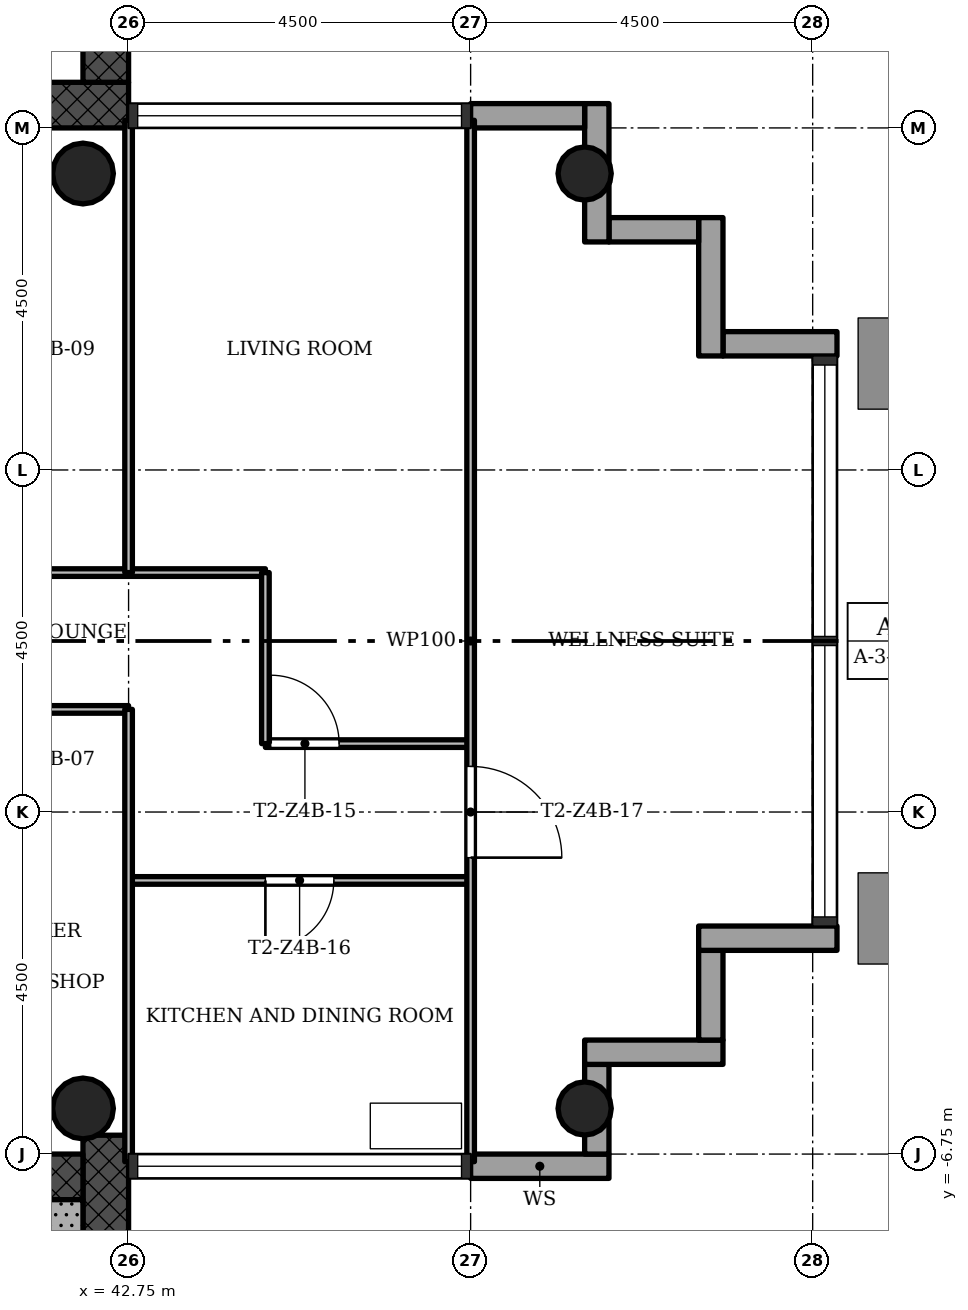
"""IFC4 building model, lengths in metres.
Left out: names, types, materials, properties, quantities, classifications, styles, units other than length and angle.
Written with IfcOpenShell. Run it as: python <this file> out.ifc"""

import sys

from ifc_helpers import new_model, si_unit, direction, frame, frame_2d, origin, origin_2d, place, context, subcontext, project, spatial, rectangle, hollow_circle, extrude, element, fill, save


model = new_model("IFC4")
c1 = context("Model", 3, precision=1e-05, world=origin(), true_north=direction((0.0, 1.0)))
c2 = subcontext(c1, "Body", "Model", "MODEL_VIEW")
j1 = project(units=[si_unit("LENGTHUNIT", "METRE"), si_unit("PLANEANGLEUNIT", "RADIAN")], contexts=[c1])
p1 = place(None, origin())
s1 = spatial("IfcSite", under=j1, at=p1, CompositionType="ELEMENT")
p2 = place(p1, origin())
s2 = spatial("IfcBuilding", under=s1, at=p2, CompositionType="ELEMENT")
p3 = place(p2, frame((0.0, 0.0, 230.0)))
s3 = spatial("IfcBuildingStorey", under=s2, at=p3, CompositionType="ELEMENT", Elevation=230.0)
p4 = place(p3, frame((29.85, 7.05, 0.0), z_axis=(0.0, 0.0, 1.0), x_axis=(1.0, 0.0, 0.0)))
e1 = element("IfcWall", 1, at=p4, inside=s3, PredefinedType="SHEAR", context=c2, shape_type="SweptSolid", body=[
    extrude(rectangle(XDim=12.9, YDim=0.6, at=frame_2d((6.45, 0.0))), origin(), (0.0, 0.0, 1.0), 3.4),
])
p5 = place(p4, frame((5.25, 0.0, 0.0)))
e2 = element("IfcOpeningElement", 2, at=p5, cuts=e1, PredefinedType="OPENING", context=c2, shape_type="SweptSolid", body=[
    extrude(rectangle(XDim=1.8, YDim=2.1, at=frame_2d((0.9, 1.05))), frame((0.0, 0.31, 0.0), z_axis=(0.0, -1.0, 0.0), x_axis=(1.0, 0.0, 0.0)), (0.0, 0.0, 1.0), 0.62),
])
p6 = place(p3, frame((42.45, 7.35, 0.0), z_axis=(0.0, 0.0, 1.0), x_axis=(0.0, 1.0, 0.0)))
e3 = element("IfcWall", 3, at=p6, inside=s3, PredefinedType="SHEAR", context=c2, shape_type="SweptSolid", body=[
    extrude(rectangle(XDim=8.4, YDim=0.6, at=frame_2d((4.2, 0.0))), origin(), (0.0, 0.0, 1.0), 3.4),
])
p7 = place(p3, frame((42.45, -15.15, 0.0), z_axis=(0.0, 0.0, 1.0), x_axis=(0.0, 1.0, 0.0)))
e4 = element("IfcWall", 4, at=p7, inside=s3, PredefinedType="SHEAR", context=c2, shape_type="SweptSolid", body=[
    extrude(rectangle(XDim=8.648, YDim=0.6, at=frame_2d((4.324, 0.0))), origin(), (0.0, 0.0, 1.0), 3.4),
])
p8 = place(p3, frame((42.15, -7.05, 0.0), z_axis=(0.0, 0.0, 1.0), x_axis=(-1.0, 0.0, 0.0)))
e5 = element("IfcWall", 5, at=p8, inside=s3, PredefinedType="SHEAR", context=c2, shape_type="SweptSolid", body=[
    extrude(rectangle(XDim=12.9, YDim=0.6, at=frame_2d((6.45, 0.0))), origin(), (0.0, 0.0, 1.0), 3.4),
])
p9 = place(p8, frame((5.25, 0.0, 0.0)))
e6 = element("IfcOpeningElement", 6, at=p9, cuts=e5, PredefinedType="OPENING", context=c2, shape_type="SweptSolid", body=[
    extrude(rectangle(XDim=1.8, YDim=2.1, at=frame_2d((0.9, 1.05))), frame((0.0, 0.31, 0.0), z_axis=(0.0, -1.0, 0.0), x_axis=(1.0, 0.0, 0.0)), (0.0, 0.0, 1.0), 0.62),
])
for number, where, z_axis, x_axis in (
    (7, (48.75, -6.15, 0.0), (0.0, 0.0, 1.0), (1.0, 0.0, 0.0)),
    (8, (48.75, 6.15, 0.0), (0.0, 0.0, 1.0), (1.0, 0.0, 0.0)),
):
    element("IfcColumn", number, at=place(p3, frame(where, z_axis=z_axis, x_axis=x_axis)), inside=s3, PredefinedType="COLUMN", context=c2, shape_type="SweptSolid", body=[
        extrude(hollow_circle(Radius=0.35, WallThickness=0.025, at=origin_2d()), origin(), (0.0, 0.0, 1.0), 3.4),
    ])
for number, where, z_axis, x_axis in (
    (9, (42.15, -6.15, 0.0), (0.0, 0.0, 1.0), (1.0, 0.0, 0.0)),
    (10, (42.15, 6.15, 0.0), (0.0, 0.0, 1.0), (1.0, 0.0, 0.0)),
):
    element("IfcColumn", number, at=place(p3, frame(where, z_axis=z_axis, x_axis=x_axis)), inside=s3, PredefinedType="COLUMN", context=c2, shape_type="SweptSolid", body=[
        extrude(hollow_circle(Radius=0.4, WallThickness=0.028, at=origin_2d()), origin(), (0.0, 0.0, 1.0), 3.4),
    ])
p10 = place(p3, frame((47.25, -6.91, -0.3), z_axis=(0.0, 0.0, 1.0), x_axis=(1.0, 0.0, 0.0)))
e11 = element("IfcWall", 11, at=p10, inside=s3, PredefinedType="STANDARD", context=c2, shape_type="SweptSolid", body=[
    extrude(rectangle(XDim=1.82, YDim=0.32, at=frame_2d((0.91, 0.0))), origin(), (0.0, 0.0, 1.0), 3.4),
])
p11 = place(p3, frame((48.91, -6.75, -0.3), z_axis=(0.0, 0.0, 1.0), x_axis=(0.0, 1.0, 0.0)))
e12 = element("IfcWall", 12, at=p11, inside=s3, PredefinedType="STANDARD", context=c2, shape_type="SweptSolid", body=[
    extrude(rectangle(XDim=1.18, YDim=0.32, at=frame_2d((0.59, 0.0))), origin(), (0.0, 0.0, 1.0), 3.4),
])
p12 = place(p3, frame((48.75, -5.41, -0.3), z_axis=(0.0, 0.0, 1.0), x_axis=(1.0, 0.0, 0.0)))
e13 = element("IfcWall", 13, at=p12, inside=s3, PredefinedType="STANDARD", context=c2, shape_type="SweptSolid", body=[
    extrude(rectangle(XDim=1.82, YDim=0.32, at=frame_2d((0.91, 0.0))), origin(), (0.0, 0.0, 1.0), 3.4),
])
p13 = place(p3, frame((50.41, -5.25, -0.3), z_axis=(0.0, 0.0, 1.0), x_axis=(0.0, 1.0, 0.0)))
e14 = element("IfcWall", 14, at=p13, inside=s3, PredefinedType="STANDARD", context=c2, shape_type="SweptSolid", body=[
    extrude(rectangle(XDim=1.18, YDim=0.32, at=frame_2d((0.59, 0.0))), origin(), (0.0, 0.0, 1.0), 3.4),
])
p14 = place(p3, frame((50.25, -3.91, -0.3), z_axis=(0.0, 0.0, 1.0), x_axis=(1.0, 0.0, 0.0)))
e15 = element("IfcWall", 15, at=p14, inside=s3, PredefinedType="STANDARD", context=c2, shape_type="SweptSolid", body=[
    extrude(rectangle(XDim=1.82, YDim=0.32, at=frame_2d((0.91, 0.0))), origin(), (0.0, 0.0, 1.0), 3.4),
])
p15 = place(p3, frame((52.07, 3.91, -0.3), z_axis=(0.0, 0.0, 1.0), x_axis=(-1.0, 0.0, 0.0)))
e16 = element("IfcWall", 16, at=p15, inside=s3, PredefinedType="STANDARD", context=c2, shape_type="SweptSolid", body=[
    extrude(rectangle(XDim=1.5, YDim=0.32, at=frame_2d((0.75, 0.0))), origin(), (0.0, 0.0, 1.0), 3.4),
])
p16 = place(p3, frame((50.41, 3.75, -0.3), z_axis=(0.0, 0.0, 1.0), x_axis=(0.0, 1.0, 0.0)))
e17 = element("IfcWall", 17, at=p16, inside=s3, PredefinedType="STANDARD", context=c2, shape_type="SweptSolid", body=[
    extrude(rectangle(XDim=1.82, YDim=0.32, at=frame_2d((0.91, 0.0))), origin(), (0.0, 0.0, 1.0), 3.4),
])
p17 = place(p3, frame((50.25, 5.41, -0.3), z_axis=(0.0, 0.0, 1.0), x_axis=(-1.0, 0.0, 0.0)))
e18 = element("IfcWall", 18, at=p17, inside=s3, PredefinedType="STANDARD", context=c2, shape_type="SweptSolid", body=[
    extrude(rectangle(XDim=1.18, YDim=0.32, at=frame_2d((0.59, 0.0))), origin(), (0.0, 0.0, 1.0), 3.4),
])
p18 = place(p3, frame((48.91, 5.25, -0.3), z_axis=(0.0, 0.0, 1.0), x_axis=(0.0, 1.0, 0.0)))
e19 = element("IfcWall", 19, at=p18, inside=s3, PredefinedType="STANDARD", context=c2, shape_type="SweptSolid", body=[
    extrude(rectangle(XDim=1.82, YDim=0.32, at=frame_2d((0.91, 0.0))), origin(), (0.0, 0.0, 1.0), 3.4),
])
p19 = place(p3, frame((48.75, 6.91, -0.3), z_axis=(0.0, 0.0, 1.0), x_axis=(-1.0, 0.0, 0.0)))
e20 = element("IfcWall", 20, at=p19, inside=s3, PredefinedType="STANDARD", context=c2, shape_type="SweptSolid", body=[
    extrude(rectangle(XDim=1.5, YDim=0.32, at=frame_2d((0.75, 0.0))), origin(), (0.0, 0.0, 1.0), 3.4),
])
p20 = place(p3, frame((47.25, -3.15, 0.0), z_axis=(0.0, 0.0, 1.0), x_axis=(-1.0, 0.0, 0.0)))
e21 = element("IfcWall", 21, at=p20, inside=s3, PredefinedType="PARTITIONING", context=c2, shape_type="SweptSolid", body=[
    extrude(rectangle(XDim=4.5, YDim=0.1, at=frame_2d((2.25, 0.0))), origin(), (0.0, 0.0, 1.0), 2.98),
])
p21 = place(p20, frame((1.8, 0.0, 0.0)))
e22 = element("IfcOpeningElement", 22, at=p21, cuts=e21, PredefinedType="OPENING", context=c2, shape_type="SweptSolid", body=[
    extrude(rectangle(XDim=0.9, YDim=2.1, at=frame_2d((0.45, 1.05))), frame((0.0, 0.06, 0.0), z_axis=(0.0, -1.0, 0.0), x_axis=(1.0, 0.0, 0.0)), (0.0, 0.0, 1.0), 0.12),
])
p22 = place(p3, frame((47.25, -1.35, 0.0), z_axis=(0.0, 0.0, 1.0), x_axis=(-1.0, 0.0, 0.0)))
e23 = element("IfcWall", 23, at=p22, inside=s3, PredefinedType="PARTITIONING", context=c2, shape_type="SweptSolid", body=[
    extrude(rectangle(XDim=2.7, YDim=0.1, at=frame_2d((1.35, 0.0))), origin(), (0.0, 0.0, 1.0), 2.98),
])
p23 = place(p22, frame((1.73, 0.0, 0.0)))
e24 = element("IfcOpeningElement", 24, at=p23, cuts=e23, PredefinedType="OPENING", context=c2, shape_type="SweptSolid", body=[
    extrude(rectangle(XDim=0.9, YDim=2.1, at=frame_2d((0.45, 1.05))), frame((0.0, 0.06, 0.0), z_axis=(0.0, -1.0, 0.0), x_axis=(1.0, 0.0, 0.0)), (0.0, 0.0, 1.0), 0.12),
])
p24 = place(p3, frame((42.75, -0.9, 0.0), z_axis=(0.0, 0.0, 1.0), x_axis=(-1.0, 0.0, 0.0)))
e25 = element("IfcWall", 25, at=p24, inside=s3, PredefinedType="PARTITIONING", context=c2, shape_type="SweptSolid", body=[
    extrude(rectangle(XDim=2.25, YDim=0.1, at=frame_2d((1.125, 0.0))), origin(), (0.0, 0.0, 1.0), 2.98),
])
p25 = place(p3, frame((44.55, 0.9, 0.0), z_axis=(0.0, 0.0, 1.0), x_axis=(-1.0, 0.0, 0.0)))
e26 = element("IfcWall", 26, at=p25, inside=s3, PredefinedType="PARTITIONING", context=c2, shape_type="SweptSolid", body=[
    extrude(rectangle(XDim=4.05, YDim=0.1, at=frame_2d((2.025, 0.0))), origin(), (0.0, 0.0, 1.0), 2.98),
])
p26 = place(p3, frame((47.25, -6.85, 0.0), z_axis=(0.0, 0.0, 1.0), x_axis=(0.0, 1.0, 0.0)))
e27 = element("IfcWall", 27, at=p26, inside=s3, PredefinedType="PARTITIONING", context=c2, shape_type="SweptSolid", body=[
    extrude(rectangle(XDim=13.7, YDim=0.1, at=frame_2d((6.85, 0.0))), origin(), (0.0, 0.0, 1.0), 2.98),
])
p27 = place(p26, frame((4.0, 0.0, 0.0)))
e28 = element("IfcOpeningElement", 28, at=p27, cuts=e27, PredefinedType="OPENING", context=c2, shape_type="SweptSolid", body=[
    extrude(rectangle(XDim=1.2, YDim=2.1, at=frame_2d((0.6, 1.05))), frame((0.0, 0.06, 0.0), z_axis=(0.0, -1.0, 0.0), x_axis=(1.0, 0.0, 0.0)), (0.0, 0.0, 1.0), 0.12),
])
p28 = place(p3, frame((44.55, -1.35, 0.0), z_axis=(0.0, 0.0, 1.0), x_axis=(0.0, 1.0, 0.0)))
e29 = element("IfcWall", 29, at=p28, inside=s3, PredefinedType="PARTITIONING", context=c2, shape_type="SweptSolid", body=[
    extrude(rectangle(XDim=2.25, YDim=0.1, at=frame_2d((1.125, 0.0))), origin(), (0.0, 0.0, 1.0), 2.98),
])
for number, where, z_axis, x_axis in (
    (30, (42.75, -6.85, 0.0), (0.0, 0.0, 1.0), (0.0, 1.0, 0.0)),
    (31, (42.75, 0.9, 0.0), (0.0, 0.0, 1.0), (0.0, 1.0, 0.0)),
):
    element("IfcWall", number, at=place(p3, frame(where, z_axis=z_axis, x_axis=x_axis)), inside=s3, PredefinedType="PARTITIONING", context=c2, shape_type="SweptSolid", body=[
        extrude(rectangle(XDim=5.95, YDim=0.1, at=frame_2d((2.975, 0.0))), origin(), (0.0, 0.0, 1.0), 2.98),
    ])
p29 = place(p3, frame((37.85, -7.65, 0.0), z_axis=(0.0, 0.0, 1.0), x_axis=(1.0, 0.0, 0.0)))
e32 = element("IfcWall", 32, at=p29, inside=s3, PredefinedType="SHEAR", context=c2, shape_type="SweptSolid", body=[
    extrude(rectangle(XDim=4.3, YDim=0.6, at=frame_2d((2.15, 0.0))), origin(), (0.0, 0.0, 1.0), 3.4),
])
p30 = place(p23, origin())
e33 = element("IfcDoor", 33, at=p30, inside=s3, OperationType="SINGLE_SWING_RIGHT", PredefinedType="DOOR", context=c2, shape_type="SweptSolid", body=[
    extrude(rectangle(XDim=0.9, YDim=2.1, at=frame_2d((0.45, 1.05))), frame((0.0, 0.025, 0.0), z_axis=(0.0, -1.0, 0.0), x_axis=(1.0, 0.0, 0.0)), (0.0, 0.0, 1.0), 0.05),
])
fill(e24, e33)
p31 = place(p21, origin())
e34 = element("IfcDoor", 34, at=p31, inside=s3, OperationType="SINGLE_SWING_LEFT", PredefinedType="DOOR", context=c2, shape_type="SweptSolid", body=[
    extrude(rectangle(XDim=0.9, YDim=2.1, at=frame_2d((0.45, 1.05))), frame((0.0, 0.025, 0.0), z_axis=(0.0, -1.0, 0.0), x_axis=(1.0, 0.0, 0.0)), (0.0, 0.0, 1.0), 0.05),
])
fill(e22, e34)
p32 = place(p27, origin())
e35 = element("IfcDoor", 35, at=p32, inside=s3, OperationType="SINGLE_SWING_LEFT", PredefinedType="DOOR", context=c2, shape_type="SweptSolid", body=[
    extrude(rectangle(XDim=1.2, YDim=2.1, at=frame_2d((0.6, 1.05))), frame((0.0, 0.025, 0.0), z_axis=(0.0, -1.0, 0.0), x_axis=(1.0, 0.0, 0.0)), (0.0, 0.0, 1.0), 0.05),
])
fill(e28, e35)
save(model, sys.argv[1])
